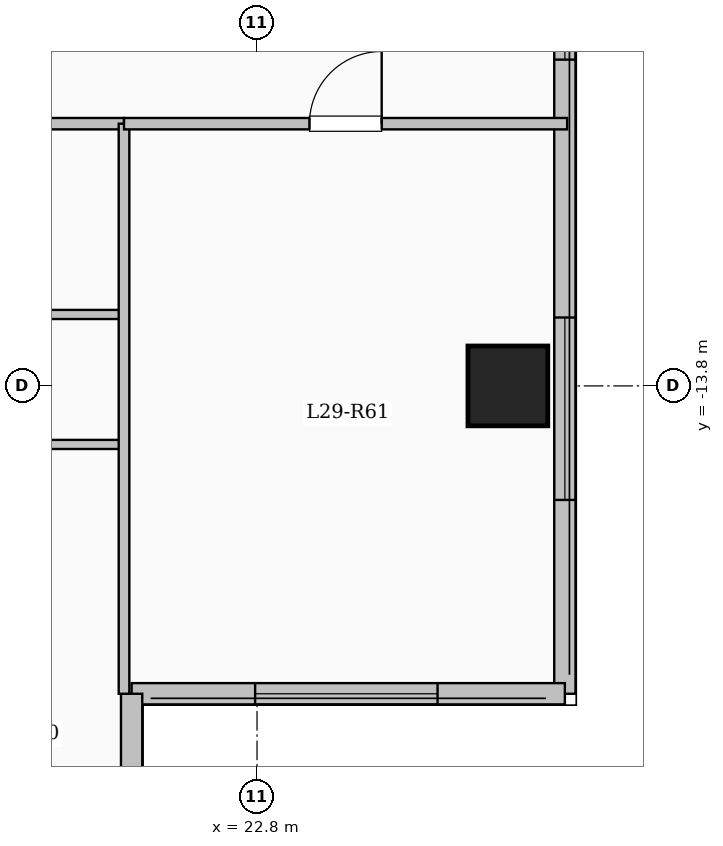
"""IFC4 building model, lengths in metres.
Left out: names, types, materials, properties, quantities, classifications, styles, units other than length and angle.
Written with IfcOpenShell. Run it as: python <this file> out.ifc"""

import sys

from ifc_helpers import new_model, si_unit, direction, frame, frame_2d, origin, origin_2d, place, context, subcontext, project, spatial, rectangle, extrude, element, fill, save


model = new_model("IFC4")
c1 = context("Model", 3, precision=1e-05, world=origin(), true_north=direction((0.0, 1.0)))
c2 = subcontext(c1, "Body", "Model", "MODEL_VIEW")
j1 = project(units=[si_unit("LENGTHUNIT", "METRE"), si_unit("PLANEANGLEUNIT", "RADIAN")], contexts=[c1])
p1 = place(None, origin())
s1 = spatial("IfcSite", under=j1, at=p1, CompositionType="ELEMENT")
p2 = place(p1, origin())
s2 = spatial("IfcBuilding", under=s1, at=p2, CompositionType="ELEMENT")
p3 = place(p2, frame((0.0, 0.0, 108.45)))
s3 = spatial("IfcBuildingStorey", under=s2, at=p3, CompositionType="ELEMENT", Elevation=108.45)
p4 = place(p3, frame((26.1, -13.8, 0.0), z_axis=(0.0, 0.0, 1.0), x_axis=(1.0, 0.0, 0.0)))
e1 = element("IfcColumn", 1, at=p4, inside=s3, PredefinedType="COLUMN", context=c2, shape_type="SweptSolid", body=[
    extrude(rectangle(XDim=1.05, YDim=1.05, at=origin_2d()), origin(), (0.0, 0.0, 1.0), 3.35),
])
p5 = place(p3, frame((26.85, 17.85, 0.0), z_axis=(0.0, 0.0, 1.0), x_axis=(0.0, -1.0, 0.0)))
e2 = element("IfcWall", 2, at=p5, inside=s3, PredefinedType="SOLIDWALL", context=c2, shape_type="SweptSolid", body=[
    extrude(rectangle(XDim=35.7, YDim=0.28, at=frame_2d((17.85, 0.0))), origin(), (0.0, 0.0, 1.0), 3.1),
])
p6 = place(p5, frame((1.675, 0.0, 0.9)))
e3 = element("IfcOpeningElement", 3, at=p6, cuts=e2, PredefinedType="OPENING", context=c2, shape_type="SweptSolid", body=[
    extrude(rectangle(XDim=2.0, YDim=1.7, at=frame_2d((1.0, 0.85))), frame((0.0, 0.15, 0.0), z_axis=(0.0, -1.0, 0.0), x_axis=(1.0, 0.0, 0.0)), (0.0, 0.0, 1.0), 0.3),
])
p7 = place(p5, frame((5.725, 0.0, 0.95)))
e4 = element("IfcOpeningElement", 4, at=p7, cuts=e2, PredefinedType="OPENING", context=c2, shape_type="SweptSolid", body=[
    extrude(rectangle(XDim=1.0, YDim=1.5, at=frame_2d((0.5, 0.75))), frame((0.0, 0.15, 0.0), z_axis=(0.0, -1.0, 0.0), x_axis=(1.0, 0.0, 0.0)), (0.0, 0.0, 1.0), 0.3),
])
p8 = place(p5, frame((8.975, 0.0, 0.9)))
e5 = element("IfcOpeningElement", 5, at=p8, cuts=e2, PredefinedType="OPENING", context=c2, shape_type="SweptSolid", body=[
    extrude(rectangle(XDim=2.0, YDim=1.7, at=frame_2d((1.0, 0.85))), frame((0.0, 0.15, 0.0), z_axis=(0.0, -1.0, 0.0), x_axis=(1.0, 0.0, 0.0)), (0.0, 0.0, 1.0), 0.3),
])
p9 = place(p5, frame((13.725, 0.0, 0.9)))
e6 = element("IfcOpeningElement", 6, at=p9, cuts=e2, PredefinedType="OPENING", context=c2, shape_type="SweptSolid", body=[
    extrude(rectangle(XDim=1.8, YDim=1.65, at=frame_2d((0.9, 0.825))), frame((0.0, 0.15, 0.0), z_axis=(0.0, -1.0, 0.0), x_axis=(1.0, 0.0, 0.0)), (0.0, 0.0, 1.0), 0.3),
])
p10 = place(p5, frame((19.55, 0.0, 0.9)))
e7 = element("IfcOpeningElement", 7, at=p10, cuts=e2, PredefinedType="OPENING", context=c2, shape_type="SweptSolid", body=[
    extrude(rectangle(XDim=2.4, YDim=1.8, at=frame_2d((1.2, 0.9))), frame((0.0, 0.15, 0.0), z_axis=(0.0, -1.0, 0.0), x_axis=(1.0, 0.0, 0.0)), (0.0, 0.0, 1.0), 0.3),
])
p11 = place(p5, frame((25.857, 0.0, 0.9)))
e8 = element("IfcOpeningElement", 8, at=p11, cuts=e2, PredefinedType="OPENING", context=c2, shape_type="SweptSolid", body=[
    extrude(rectangle(XDim=1.5, YDim=1.65, at=frame_2d((0.75, 0.825))), frame((0.0, 0.15, 0.0), z_axis=(0.0, -1.0, 0.0), x_axis=(1.0, 0.0, 0.0)), (0.0, 0.0, 1.0), 0.3),
])
p12 = place(p5, frame((30.75, 0.0, 0.9)))
e9 = element("IfcOpeningElement", 9, at=p12, cuts=e2, PredefinedType="OPENING", context=c2, shape_type="SweptSolid", body=[
    extrude(rectangle(XDim=2.4, YDim=1.8, at=frame_2d((1.2, 0.9))), frame((0.0, 0.15, 0.0), z_axis=(0.0, -1.0, 0.0), x_axis=(1.0, 0.0, 0.0)), (0.0, 0.0, 1.0), 0.3),
])
p13 = place(p3, frame((26.85, -17.85, 0.0), z_axis=(0.0, 0.0, 1.0), x_axis=(-1.0, 0.0, 0.0)))
e10 = element("IfcWall", 10, at=p13, inside=s3, PredefinedType="SOLIDWALL", context=c2, shape_type="SweptSolid", body=[
    extrude(rectangle(XDim=5.7, YDim=0.28, at=frame_2d((2.85, 0.0))), origin(), (0.0, 0.0, 1.0), 3.1),
])
p14 = place(p13, frame((1.675, 0.0, 0.9)))
e11 = element("IfcOpeningElement", 11, at=p14, cuts=e10, PredefinedType="OPENING", context=c2, shape_type="SweptSolid", body=[
    extrude(rectangle(XDim=2.4, YDim=1.8, at=frame_2d((1.2, 0.9))), frame((0.0, 0.15, 0.0), z_axis=(0.0, -1.0, 0.0), x_axis=(1.0, 0.0, 0.0)), (0.0, 0.0, 1.0), 0.3),
])
p15 = place(p3, frame((21.15, -17.85, 0.0), z_axis=(0.0, 0.0, 1.0), x_axis=(0.0, -1.0, 0.0)))
e12 = element("IfcWall", 12, at=p15, inside=s3, PredefinedType="SOLIDWALL", context=c2, shape_type="SweptSolid", body=[
    extrude(rectangle(XDim=4.2, YDim=0.28, at=frame_2d((2.1, 0.0))), origin(), (0.0, 0.0, 1.0), 3.1),
])
p16 = place(p15, frame((1.182, 0.0, 0.9)))
e13 = element("IfcOpeningElement", 13, at=p16, cuts=e12, PredefinedType="OPENING", context=c2, shape_type="SweptSolid", body=[
    extrude(rectangle(XDim=1.8, YDim=1.65, at=frame_2d((0.9, 0.825))), frame((0.0, 0.15, 0.0), z_axis=(0.0, -1.0, 0.0), x_axis=(1.0, 0.0, 0.0)), (0.0, 0.0, 1.0), 0.3),
])
p17 = place(p3, frame((8.55, -10.35, 0.0), z_axis=(0.0, 0.0, 1.0), x_axis=(1.0, 0.0, 0.0)))
e14 = element("IfcWall", 14, at=p17, inside=s3, PredefinedType="PARTITIONING", context=c2, shape_type="SweptSolid", body=[
    extrude(rectangle(XDim=12.5, YDim=0.15, at=frame_2d((6.25, 0.0))), origin(), (0.0, 0.0, 1.0), 3.1),
])
p18 = place(p17, frame((0.75, 0.0, 0.0)))
e15 = element("IfcOpeningElement", 15, at=p18, cuts=e14, PredefinedType="OPENING", context=c2, shape_type="SweptSolid", body=[
    extrude(rectangle(XDim=0.96, YDim=2.15, at=frame_2d((0.48, 1.075))), frame((0.0, 0.085, 0.0), z_axis=(0.0, -1.0, 0.0), x_axis=(1.0, 0.0, 0.0)), (0.0, 0.0, 1.0), 0.17),
])
p19 = place(p3, frame((17.165, -12.86, 0.0), z_axis=(0.0, 0.0, 1.0), x_axis=(1.0, 0.0, 0.0)))
e16 = element("IfcWall", 16, at=p19, inside=s3, PredefinedType="PARTITIONING", context=c2, shape_type="SweptSolid", body=[
    extrude(rectangle(XDim=3.885, YDim=0.12, at=frame_2d((1.942, 0.0))), origin(), (0.0, 0.0, 1.0), 3.1),
])
p20 = place(p19, frame((1.503, 0.0, 0.0)))
e17 = element("IfcOpeningElement", 17, at=p20, cuts=e16, PredefinedType="OPENING", context=c2, shape_type="SweptSolid", body=[
    extrude(rectangle(XDim=0.88, YDim=2.1, at=frame_2d((0.44, 1.05))), frame((0.0, 0.07, 0.0), z_axis=(0.0, -1.0, 0.0), x_axis=(1.0, 0.0, 0.0)), (0.0, 0.0, 1.0), 0.14),
])
p21 = place(p3, frame((12.792, -14.57, 0.0), z_axis=(0.0, 0.0, 1.0), x_axis=(1.0, 0.0, 0.0)))
e18 = element("IfcWall", 18, at=p21, inside=s3, PredefinedType="PARTITIONING", context=c2, shape_type="SweptSolid", body=[
    extrude(rectangle(XDim=8.318, YDim=0.12, at=frame_2d((4.159, 0.0))), origin(), (0.0, 0.0, 1.0), 2.635),
])
p22 = place(p21, frame((0.916, 0.0, 0.0)))
e19 = element("IfcOpeningElement", 19, at=p22, cuts=e18, PredefinedType="OPENING", context=c2, shape_type="SweptSolid", body=[
    extrude(rectangle(XDim=0.88, YDim=2.1, at=frame_2d((0.44, 1.05))), frame((0.0, 0.07, 0.0), z_axis=(0.0, -1.0, 0.0), x_axis=(1.0, 0.0, 0.0)), (0.0, 0.0, 1.0), 0.14),
])
p23 = place(p21, frame((3.629, 0.0, 0.0)))
e20 = element("IfcOpeningElement", 20, at=p23, cuts=e18, PredefinedType="OPENING", context=c2, shape_type="SweptSolid", body=[
    extrude(rectangle(XDim=0.88, YDim=2.1, at=frame_2d((0.44, 1.05))), frame((0.0, 0.07, 0.0), z_axis=(0.0, -1.0, 0.0), x_axis=(1.0, 0.0, 0.0)), (0.0, 0.0, 1.0), 0.14),
])
p24 = place(p21, frame((6.342, 0.0, 0.0)))
e21 = element("IfcOpeningElement", 21, at=p24, cuts=e18, PredefinedType="OPENING", context=c2, shape_type="SweptSolid", body=[
    extrude(rectangle(XDim=0.88, YDim=2.1, at=frame_2d((0.44, 1.05))), frame((0.0, 0.07, 0.0), z_axis=(0.0, -1.0, 0.0), x_axis=(1.0, 0.0, 0.0)), (0.0, 0.0, 1.0), 0.14),
])
p25 = place(p3, frame((21.05, -17.85, 0.0), z_axis=(0.0, 0.0, 1.0), x_axis=(0.0, 1.0, 0.0)))
e22 = element("IfcWall", 22, at=p25, inside=s3, PredefinedType="PARTITIONING", context=c2, shape_type="SweptSolid", body=[
    extrude(rectangle(XDim=7.5, YDim=0.14, at=frame_2d((3.75, 0.0))), origin(), (0.0, 0.0, 1.0), 3.1),
])
p26 = place(p3, frame((21.05, -10.35, 0.0), z_axis=(0.0, 0.0, 1.0), x_axis=(1.0, 0.0, 0.0)))
e23 = element("IfcWall", 23, at=p26, inside=s3, PredefinedType="PARTITIONING", context=c2, shape_type="SweptSolid", body=[
    extrude(rectangle(XDim=5.83, YDim=0.15, at=frame_2d((2.915, 0.0))), origin(), (0.0, 0.0, 1.0), 3.1),
])
p27 = place(p26, frame((2.44, 0.0, 0.0)))
e24 = element("IfcOpeningElement", 24, at=p27, cuts=e23, PredefinedType="OPENING", context=c2, shape_type="SweptSolid", body=[
    extrude(rectangle(XDim=0.95, YDim=2.15, at=frame_2d((0.475, 1.075))), frame((0.0, 0.085, 0.0), z_axis=(0.0, -1.0, 0.0), x_axis=(1.0, 0.0, 0.0)), (0.0, 0.0, 1.0), 0.17),
])
p28 = place(p11, origin())
e25 = element("IfcWindow", 25, at=p28, inside=s3, PartitioningType="SINGLE_PANEL", PredefinedType="WINDOW", context=c2, shape_type="SweptSolid", body=[
    extrude(rectangle(XDim=1.5, YDim=1.65, at=frame_2d((0.75, 0.825))), frame((0.0, 0.03, 0.0), z_axis=(0.0, -1.0, 0.0), x_axis=(1.0, 0.0, 0.0)), (0.0, 0.0, 1.0), 0.06),
])
fill(e8, e25)
p29 = place(p12, origin())
e26 = element("IfcWindow", 26, at=p29, inside=s3, PartitioningType="SINGLE_PANEL", PredefinedType="WINDOW", context=c2, shape_type="SweptSolid", body=[
    extrude(rectangle(XDim=2.4, YDim=1.8, at=frame_2d((1.2, 0.9))), frame((0.0, 0.03, 0.0), z_axis=(0.0, -1.0, 0.0), x_axis=(1.0, 0.0, 0.0)), (0.0, 0.0, 1.0), 0.06),
])
fill(e9, e26)
p30 = place(p14, origin())
e27 = element("IfcWindow", 27, at=p30, inside=s3, PartitioningType="SINGLE_PANEL", PredefinedType="WINDOW", context=c2, shape_type="SweptSolid", body=[
    extrude(rectangle(XDim=2.4, YDim=1.8, at=frame_2d((1.2, 0.9))), frame((0.0, 0.03, 0.0), z_axis=(0.0, -1.0, 0.0), x_axis=(1.0, 0.0, 0.0)), (0.0, 0.0, 1.0), 0.06),
])
fill(e11, e27)
p31 = place(p27, origin())
e28 = element("IfcDoor", 28, at=p31, inside=s3, OperationType="SINGLE_SWING_RIGHT", PredefinedType="DOOR", context=c2, shape_type="SweptSolid", body=[
    extrude(rectangle(XDim=0.95, YDim=2.15, at=frame_2d((0.475, 1.075))), frame((0.0, 0.025, 0.0), z_axis=(0.0, -1.0, 0.0), x_axis=(1.0, 0.0, 0.0)), (0.0, 0.0, 1.0), 0.05),
])
fill(e24, e28)
save(model, sys.argv[1])
